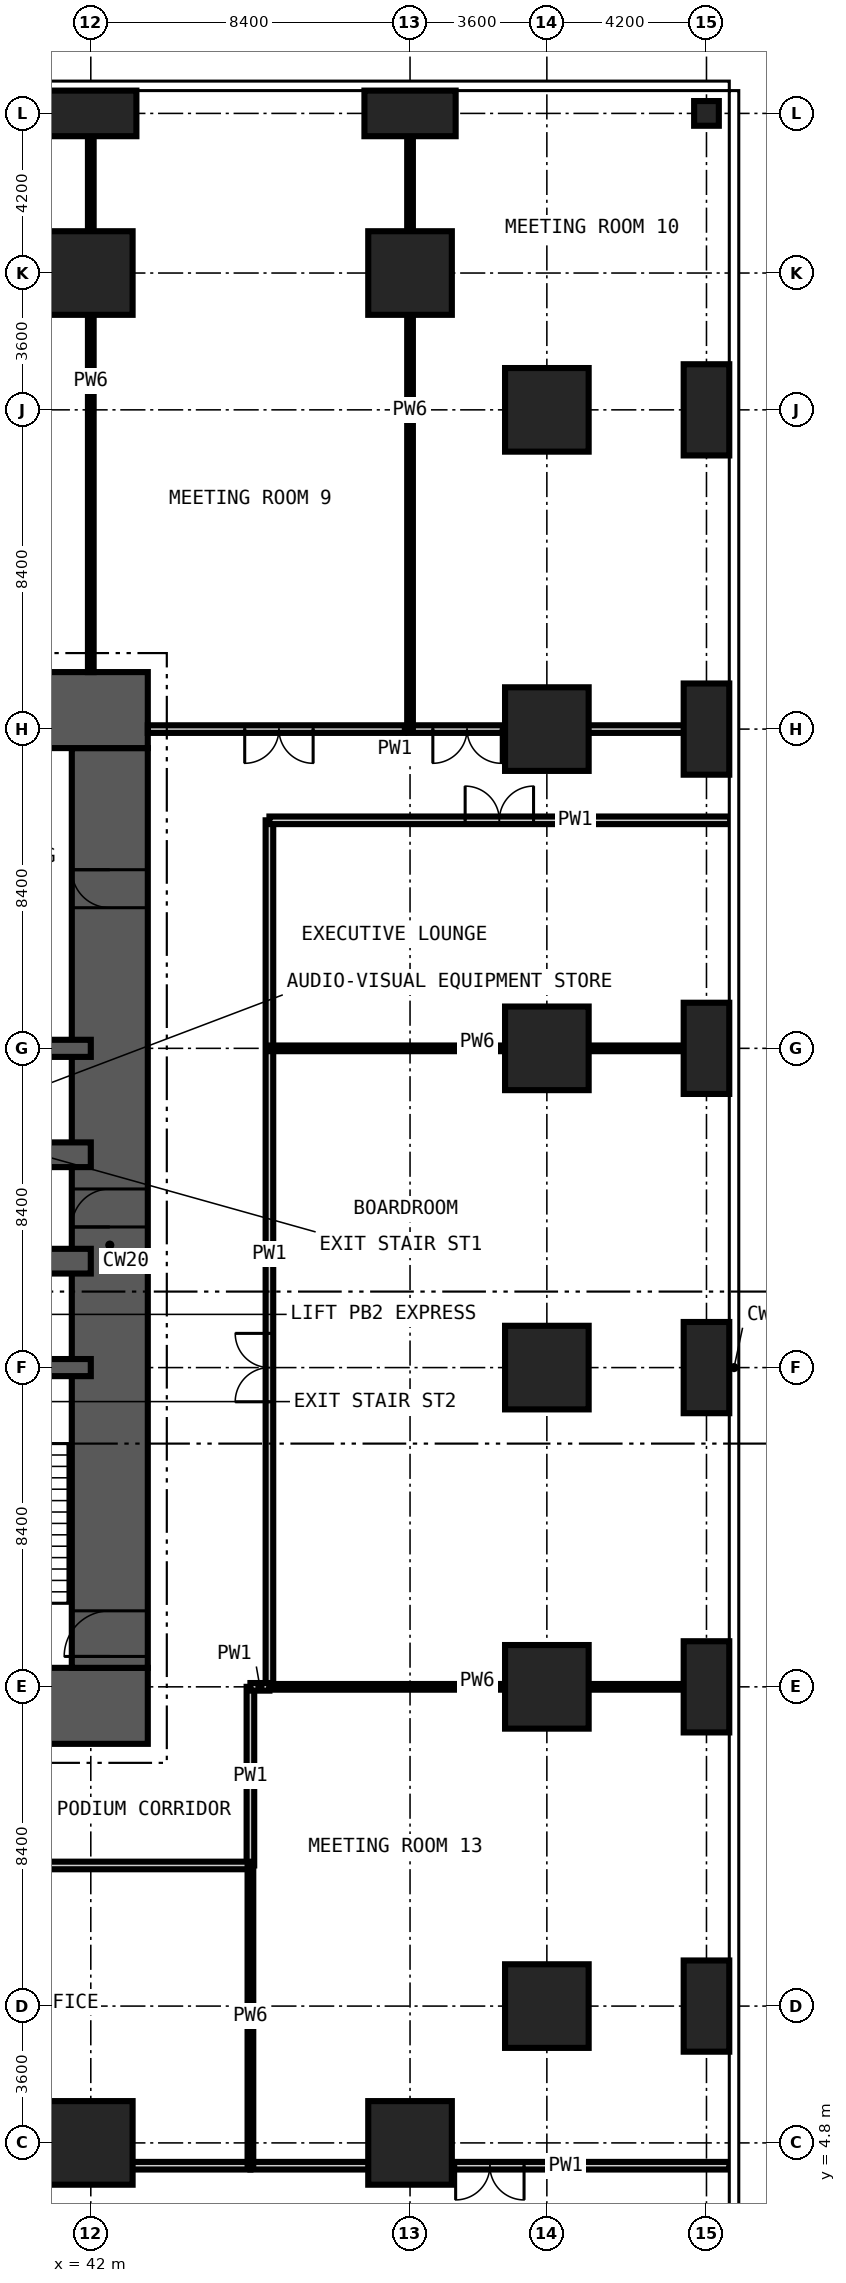
"""IFC4 building model, lengths in metres.
Left out: names, types, materials, properties, quantities, classifications, styles, units other than length and angle.
Written with IfcOpenShell. Run it as: python <this file> out.ifc"""

import sys

from ifc_helpers import new_model, si_unit, direction, frame, frame_2d, origin, origin_2d, place, context, subcontext, project, spatial, rectangle, extrude, element, fill, save


model = new_model("IFC4")
c1 = context("Model", 3, precision=1e-05, world=origin(), true_north=direction((0.0, 1.0)))
c2 = subcontext(c1, "Body", "Model", "MODEL_VIEW")
j1 = project(units=[si_unit("LENGTHUNIT", "METRE"), si_unit("PLANEANGLEUNIT", "RADIAN")], contexts=[c1])
p1 = place(None, origin())
s1 = spatial("IfcSite", under=j1, at=p1, CompositionType="ELEMENT")
p2 = place(p1, origin())
s2 = spatial("IfcBuilding", under=s1, at=p2, CompositionType="ELEMENT")
p3 = place(p2, frame((0.0, 0.0, 12.0)))
s3 = spatial("IfcBuildingStorey", under=s2, at=p3, CompositionType="ELEMENT", Elevation=12.0)
for number, where, z_axis, x_axis in (
    (1, (42.0, 4.8, -0.3), (0.0, 0.0, 1.0), (1.0, 0.0, 0.0)),
    (2, (42.0, 54.0, -0.3), (0.0, 0.0, 1.0), (1.0, 0.0, 0.0)),
):
    element("IfcColumn", number, at=place(p3, frame(where, z_axis=z_axis, x_axis=x_axis)), inside=s3, PredefinedType="COLUMN", context=c2, shape_type="SweptSolid", body=[
        extrude(rectangle(XDim=2.2, YDim=2.2, at=origin_2d()), origin(), (0.0, 0.0, 1.0), 5.0),
    ])
p4 = place(p3, frame((42.0, 58.2, -0.3), z_axis=(0.0, 0.0, 1.0), x_axis=(1.0, 0.0, 0.0)))
e3 = element("IfcColumn", 3, at=p4, inside=s3, PredefinedType="COLUMN", context=c2, shape_type="SweptSolid", body=[
    extrude(rectangle(XDim=2.4, YDim=1.2, at=origin_2d()), origin(), (0.0, 0.0, 1.0), 5.0),
])
for number, where, z_axis, x_axis in (
    (4, (50.4, 4.8, -0.3), (0.0, 0.0, 1.0), (1.0, 0.0, 0.0)),
    (5, (50.4, 54.0, -0.3), (0.0, 0.0, 1.0), (1.0, 0.0, 0.0)),
):
    element("IfcColumn", number, at=place(p3, frame(where, z_axis=z_axis, x_axis=x_axis)), inside=s3, PredefinedType="COLUMN", context=c2, shape_type="SweptSolid", body=[
        extrude(rectangle(XDim=2.2, YDim=2.2, at=origin_2d()), origin(), (0.0, 0.0, 1.0), 5.0),
    ])
p5 = place(p3, frame((50.4, 58.2, -0.3), z_axis=(0.0, 0.0, 1.0), x_axis=(1.0, 0.0, 0.0)))
e6 = element("IfcColumn", 6, at=p5, inside=s3, PredefinedType="COLUMN", context=c2, shape_type="SweptSolid", body=[
    extrude(rectangle(XDim=2.4, YDim=1.2, at=origin_2d()), origin(), (0.0, 0.0, 1.0), 5.0),
])
for number, where, z_axis, x_axis in (
    (7, (54.0, 8.4, -0.3), (0.0, 0.0, 1.0), (1.0, 0.0, 0.0)),
    (8, (54.0, 16.8, -0.3), (0.0, 0.0, 1.0), (1.0, 0.0, 0.0)),
    (9, (54.0, 25.2, -0.3), (0.0, 0.0, 1.0), (1.0, 0.0, 0.0)),
    (10, (54.0, 33.6, -0.3), (0.0, 0.0, 1.0), (1.0, 0.0, 0.0)),
    (11, (54.0, 42.0, -0.3), (0.0, 0.0, 1.0), (1.0, 0.0, 0.0)),
    (12, (54.0, 50.4, -0.3), (0.0, 0.0, 1.0), (1.0, 0.0, 0.0)),
):
    element("IfcColumn", number, at=place(p3, frame(where, z_axis=z_axis, x_axis=x_axis)), inside=s3, PredefinedType="COLUMN", context=c2, shape_type="SweptSolid", body=[
        extrude(rectangle(XDim=2.2, YDim=2.2, at=origin_2d()), origin(), (0.0, 0.0, 1.0), 5.0),
    ])
for number, where, z_axis, x_axis in (
    (13, (58.2, 8.4, -0.3), (0.0, 0.0, 1.0), (1.0, 0.0, 0.0)),
    (14, (58.2, 16.8, -0.3), (0.0, 0.0, 1.0), (1.0, 0.0, 0.0)),
    (15, (58.2, 25.2, -0.3), (0.0, 0.0, 1.0), (1.0, 0.0, 0.0)),
    (16, (58.2, 33.6, -0.3), (0.0, 0.0, 1.0), (1.0, 0.0, 0.0)),
    (17, (58.2, 42.0, -0.3), (0.0, 0.0, 1.0), (1.0, 0.0, 0.0)),
    (18, (58.2, 50.4, -0.3), (0.0, 0.0, 1.0), (1.0, 0.0, 0.0)),
):
    element("IfcColumn", number, at=place(p3, frame(where, z_axis=z_axis, x_axis=x_axis)), inside=s3, PredefinedType="COLUMN", context=c2, shape_type="SweptSolid", body=[
        extrude(rectangle(XDim=1.2, YDim=2.4, at=origin_2d()), origin(), (0.0, 0.0, 1.0), 5.0),
    ])
p6 = place(p3, frame((58.2, 58.2, -0.3), z_axis=(0.0, 0.0, 1.0), x_axis=(1.0, 0.0, 0.0)))
e19 = element("IfcColumn", 19, at=p6, inside=s3, PredefinedType="COLUMN", context=c2, shape_type="SweptSolid", body=[
    extrude(rectangle(XDim=0.65, YDim=0.65, at=origin_2d()), origin(), (0.0, 0.0, 1.0), 5.0),
])
p7 = place(p3, frame((15.3, 16.3, -0.3), z_axis=(0.0, 0.0, 1.0), x_axis=(1.0, 0.0, 0.0)))
e20 = element("IfcWall", 20, at=p7, inside=s3, PredefinedType="SHEAR", context=c2, shape_type="SweptSolid", body=[
    extrude(rectangle(XDim=28.2, YDim=2.0, at=frame_2d((14.1, 0.0))), origin(), (0.0, 0.0, 1.0), 5.0),
])
p8 = place(p7, frame((13.6, 0.0, 0.3)))
e21 = element("IfcOpeningElement", 21, at=p8, cuts=e20, PredefinedType="OPENING", context=c2, shape_type="SweptSolid", body=[
    extrude(rectangle(XDim=1.0, YDim=2.1, at=frame_2d((0.5, 1.05))), frame((0.0, 1.01, 0.0), z_axis=(0.0, -1.0, 0.0), x_axis=(1.0, 0.0, 0.0)), (0.0, 0.0, 1.0), 2.02),
])
p9 = place(p7, frame((19.9, 0.0, 0.3)))
e22 = element("IfcOpeningElement", 22, at=p9, cuts=e20, PredefinedType="OPENING", context=c2, shape_type="SweptSolid", body=[
    extrude(rectangle(XDim=1.0, YDim=2.1, at=frame_2d((0.5, 1.05))), frame((0.0, 1.01, 0.0), z_axis=(0.0, -1.0, 0.0), x_axis=(1.0, 0.0, 0.0)), (0.0, 0.0, 1.0), 2.02),
])
p10 = place(p3, frame((42.5, 17.3, -0.3), z_axis=(0.0, 0.0, 1.0), x_axis=(0.0, 1.0, 0.0)))
e23 = element("IfcWall", 23, at=p10, inside=s3, PredefinedType="SHEAR", context=c2, shape_type="SweptSolid", body=[
    extrude(rectangle(XDim=24.2, YDim=2.0, at=frame_2d((12.1, 0.0))), origin(), (0.0, 0.0, 1.0), 5.0),
])
p11 = place(p10, frame((0.3, 0.0, 0.3)))
e24 = element("IfcOpeningElement", 24, at=p11, cuts=e23, PredefinedType="OPENING", context=c2, shape_type="SweptSolid", body=[
    extrude(rectangle(XDim=1.2, YDim=2.2, at=frame_2d((0.6, 1.1))), frame((0.0, 1.01, 0.0), z_axis=(0.0, -1.0, 0.0), x_axis=(1.0, 0.0, 0.0)), (0.0, 0.0, 1.0), 2.02),
])
p12 = place(p10, frame((11.6, 0.0, 0.3)))
e25 = element("IfcOpeningElement", 25, at=p12, cuts=e23, PredefinedType="OPENING", context=c2, shape_type="SweptSolid", body=[
    extrude(rectangle(XDim=1.0, YDim=2.1, at=frame_2d((0.5, 1.05))), frame((0.0, 1.01, 0.0), z_axis=(0.0, -1.0, 0.0), x_axis=(1.0, 0.0, 0.0)), (0.0, 0.0, 1.0), 2.02),
])
p13 = place(p10, frame((20.0, 0.0, 0.3)))
e26 = element("IfcOpeningElement", 26, at=p13, cuts=e23, PredefinedType="OPENING", context=c2, shape_type="SweptSolid", body=[
    extrude(rectangle(XDim=1.0, YDim=2.1, at=frame_2d((0.5, 1.05))), frame((0.0, 1.01, 0.0), z_axis=(0.0, -1.0, 0.0), x_axis=(1.0, 0.0, 0.0)), (0.0, 0.0, 1.0), 2.02),
])
p14 = place(p3, frame((43.5, 42.5, -0.3), z_axis=(0.0, 0.0, 1.0), x_axis=(-1.0, 0.0, 0.0)))
e27 = element("IfcWall", 27, at=p14, inside=s3, PredefinedType="SHEAR", context=c2, shape_type="SweptSolid", body=[
    extrude(rectangle(XDim=28.2, YDim=2.0, at=frame_2d((14.1, 0.0))), origin(), (0.0, 0.0, 1.0), 5.0),
])
p15 = place(p14, frame((21.4, 0.0, 0.3)))
e28 = element("IfcOpeningElement", 28, at=p15, cuts=e27, PredefinedType="OPENING", context=c2, shape_type="SweptSolid", body=[
    extrude(rectangle(XDim=1.0, YDim=2.1, at=frame_2d((0.5, 1.05))), frame((0.0, 1.01, 0.0), z_axis=(0.0, -1.0, 0.0), x_axis=(1.0, 0.0, 0.0)), (0.0, 0.0, 1.0), 2.02),
])
p16 = place(p14, frame((11.4, 0.0, 0.3)))
e29 = element("IfcOpeningElement", 29, at=p16, cuts=e27, PredefinedType="OPENING", context=c2, shape_type="SweptSolid", body=[
    extrude(rectangle(XDim=1.2, YDim=2.2, at=frame_2d((0.6, 1.1))), frame((0.0, 1.01, 0.0), z_axis=(0.0, -1.0, 0.0), x_axis=(1.0, 0.0, 0.0)), (0.0, 0.0, 1.0), 2.02),
])
for number, where, z_axis, x_axis in (
    (30, (16.8, 25.2, -0.3), (0.0, 0.0, 1.0), (1.0, 0.0, 0.0)),
    (31, (16.8, 33.6, -0.3), (0.0, 0.0, 1.0), (1.0, 0.0, 0.0)),
):
    element("IfcWall", number, at=place(p3, frame(where, z_axis=z_axis, x_axis=x_axis)), inside=s3, PredefinedType="SHEAR", context=c2, shape_type="SweptSolid", body=[
        extrude(rectangle(XDim=25.2, YDim=0.45, at=frame_2d((12.6, 0.0))), origin(), (0.0, 0.0, 1.0), 5.0),
    ])
p17 = place(p3, frame((33.6, 28.0, -0.3), z_axis=(0.0, 0.0, 1.0), x_axis=(1.0, 0.0, 0.0)))
e32 = element("IfcWall", 32, at=p17, inside=s3, PredefinedType="SHEAR", context=c2, shape_type="SweptSolid", body=[
    extrude(rectangle(XDim=8.4, YDim=0.65, at=frame_2d((4.2, 0.0))), origin(), (0.0, 0.0, 1.0), 5.0),
])
p18 = place(p3, frame((33.6, 30.8, -0.3), z_axis=(0.0, 0.0, 1.0), x_axis=(1.0, 0.0, 0.0)))
e33 = element("IfcWall", 33, at=p18, inside=s3, PredefinedType="SHEAR", context=c2, shape_type="SweptSolid", body=[
    extrude(rectangle(XDim=8.4, YDim=0.65, at=frame_2d((4.2, 0.0))), origin(), (0.0, 0.0, 1.0), 5.0),
])
p19 = place(p18, frame((1.6, 0.0, 0.3)))
e34 = element("IfcOpeningElement", 34, at=p19, cuts=e33, PredefinedType="OPENING", context=c2, shape_type="SweptSolid", body=[
    extrude(rectangle(XDim=1.0, YDim=2.1, at=frame_2d((0.5, 1.05))), frame((0.0, 0.335, 0.0), z_axis=(0.0, -1.0, 0.0), x_axis=(1.0, 0.0, 0.0)), (0.0, 0.0, 1.0), 0.67),
])
p20 = place(p18, frame((4.6, 0.0, 0.3)))
e35 = element("IfcOpeningElement", 35, at=p20, cuts=e33, PredefinedType="OPENING", context=c2, shape_type="SweptSolid", body=[
    extrude(rectangle(XDim=1.0, YDim=2.1, at=frame_2d((0.5, 1.05))), frame((0.0, 0.335, 0.0), z_axis=(0.0, -1.0, 0.0), x_axis=(1.0, 0.0, 0.0)), (0.0, 0.0, 1.0), 0.67),
])
p21 = place(p3, frame((46.2, 12.1, 0.0), z_axis=(0.0, 0.0, 1.0), x_axis=(0.0, 1.0, 0.0)))
e36 = element("IfcWall", 36, at=p21, inside=s3, PredefinedType="PARTITIONING", context=c2, shape_type="SweptSolid", body=[
    extrude(rectangle(XDim=4.7, YDim=0.2, at=frame_2d((2.35, 0.0))), origin(), (0.0, 0.0, 1.0), 4.7),
])
p22 = place(p3, frame((46.7, 16.8, 0.0), z_axis=(0.0, 0.0, 1.0), x_axis=(0.0, 1.0, 0.0)))
e37 = element("IfcWall", 37, at=p22, inside=s3, PredefinedType="PARTITIONING", context=c2, shape_type="SweptSolid", body=[
    extrude(rectangle(XDim=22.8, YDim=0.2, at=frame_2d((11.4, 0.0))), origin(), (0.0, 0.0, 1.0), 4.7),
])
p23 = place(p22, frame((7.5, 0.0, 0.0)))
e38 = element("IfcOpeningElement", 38, at=p23, cuts=e37, PredefinedType="OPENING", context=c2, shape_type="SweptSolid", body=[
    extrude(rectangle(XDim=1.8, YDim=2.4, at=frame_2d((0.9, 1.2))), frame((0.0, 0.11, 0.0), z_axis=(0.0, -1.0, 0.0), x_axis=(1.0, 0.0, 0.0)), (0.0, 0.0, 1.0), 0.22),
])
p24 = place(p3, frame((0.0, 4.2, 0.0), z_axis=(0.0, 0.0, 1.0), x_axis=(1.0, 0.0, 0.0)))
e39 = element("IfcWall", 39, at=p24, inside=s3, PredefinedType="PARTITIONING", context=c2, shape_type="SweptSolid", body=[
    extrude(rectangle(XDim=46.2, YDim=0.2, at=frame_2d((23.1, 0.0))), origin(), (0.0, 0.0, 1.0), 4.7),
])
p25 = place(p24, frame((5.8, 0.0, 0.0)))
e40 = element("IfcOpeningElement", 40, at=p25, cuts=e39, PredefinedType="OPENING", context=c2, shape_type="SweptSolid", body=[
    extrude(rectangle(XDim=1.0, YDim=2.1, at=frame_2d((0.5, 1.05))), frame((0.0, 0.11, 0.0), z_axis=(0.0, -1.0, 0.0), x_axis=(1.0, 0.0, 0.0)), (0.0, 0.0, 1.0), 0.22),
])
p26 = place(p24, frame((18.4, 0.0, 0.0)))
e41 = element("IfcOpeningElement", 41, at=p26, cuts=e39, PredefinedType="OPENING", context=c2, shape_type="SweptSolid", body=[
    extrude(rectangle(XDim=1.0, YDim=2.1, at=frame_2d((0.5, 1.05))), frame((0.0, 0.11, 0.0), z_axis=(0.0, -1.0, 0.0), x_axis=(1.0, 0.0, 0.0)), (0.0, 0.0, 1.0), 0.22),
])
p27 = place(p24, frame((28.9, 0.0, 0.0)))
e42 = element("IfcOpeningElement", 42, at=p27, cuts=e39, PredefinedType="OPENING", context=c2, shape_type="SweptSolid", body=[
    extrude(rectangle(XDim=1.0, YDim=2.1, at=frame_2d((0.5, 1.05))), frame((0.0, 0.11, 0.0), z_axis=(0.0, -1.0, 0.0), x_axis=(1.0, 0.0, 0.0)), (0.0, 0.0, 1.0), 0.22),
])
p28 = place(p24, frame((39.4, 0.0, 0.0)))
e43 = element("IfcOpeningElement", 43, at=p28, cuts=e39, PredefinedType="OPENING", context=c2, shape_type="SweptSolid", body=[
    extrude(rectangle(XDim=1.0, YDim=2.1, at=frame_2d((0.5, 1.05))), frame((0.0, 0.11, 0.0), z_axis=(0.0, -1.0, 0.0), x_axis=(1.0, 0.0, 0.0)), (0.0, 0.0, 1.0), 0.22),
])
p29 = place(p3, frame((12.6, 12.1, 0.0), z_axis=(0.0, 0.0, 1.0), x_axis=(1.0, 0.0, 0.0)))
e44 = element("IfcWall", 44, at=p29, inside=s3, PredefinedType="PARTITIONING", context=c2, shape_type="SweptSolid", body=[
    extrude(rectangle(XDim=33.6, YDim=0.2, at=frame_2d((16.8, 0.0))), origin(), (0.0, 0.0, 1.0), 4.7),
])
p30 = place(p3, frame((46.2, 16.8, 0.0), z_axis=(0.0, 0.0, 1.0), x_axis=(1.0, 0.0, 0.0)))
e45 = element("IfcWall", 45, at=p30, inside=s3, PredefinedType="PARTITIONING", context=c2, shape_type="SweptSolid", body=[
    extrude(rectangle(XDim=0.5, YDim=0.2, at=frame_2d((0.25, 0.0))), origin(), (0.0, 0.0, 1.0), 4.7),
])
p31 = place(p3, frame((46.7, 39.6, 0.0), z_axis=(0.0, 0.0, 1.0), x_axis=(1.0, 0.0, 0.0)))
e46 = element("IfcWall", 46, at=p31, inside=s3, PredefinedType="PARTITIONING", context=c2, shape_type="SweptSolid", body=[
    extrude(rectangle(XDim=12.123, YDim=0.2, at=frame_2d((6.062, 0.0))), origin(), (0.0, 0.0, 1.0), 4.7),
])
p32 = place(p31, frame((5.15, 0.0, 0.0)))
e47 = element("IfcOpeningElement", 47, at=p32, cuts=e46, PredefinedType="OPENING", context=c2, shape_type="SweptSolid", body=[
    extrude(rectangle(XDim=1.8, YDim=2.4, at=frame_2d((0.9, 1.2))), frame((0.0, 0.11, 0.0), z_axis=(0.0, -1.0, 0.0), x_axis=(1.0, 0.0, 0.0)), (0.0, 0.0, 1.0), 0.22),
])
p33 = place(p3, frame((58.8, 4.2, 0.0), z_axis=(0.0, 0.0, 1.0), x_axis=(-1.0, 0.0, 0.0)))
e48 = element("IfcWall", 48, at=p33, inside=s3, PredefinedType="PARTITIONING", context=c2, shape_type="SweptSolid", body=[
    extrude(rectangle(XDim=12.6, YDim=0.2, at=frame_2d((6.3, 0.0))), origin(), (0.0, 0.0, 1.0), 4.7),
])
p34 = place(p33, frame((5.4, 0.0, 0.0)))
e49 = element("IfcOpeningElement", 49, at=p34, cuts=e48, PredefinedType="OPENING", context=c2, shape_type="SweptSolid", body=[
    extrude(rectangle(XDim=1.8, YDim=2.4, at=frame_2d((0.9, 1.2))), frame((0.0, 0.11, 0.0), z_axis=(0.0, -1.0, 0.0), x_axis=(1.0, 0.0, 0.0)), (0.0, 0.0, 1.0), 0.22),
])
p35 = place(p3, frame((58.8, 42.0, 0.0), z_axis=(0.0, 0.0, 1.0), x_axis=(-1.0, 0.0, 0.0)))
e50 = element("IfcWall", 50, at=p35, inside=s3, PredefinedType="PARTITIONING", context=c2, shape_type="SweptSolid", body=[
    extrude(rectangle(XDim=15.3, YDim=0.2, at=frame_2d((7.65, 0.0))), origin(), (0.0, 0.0, 1.0), 4.7),
])
p36 = place(p35, frame((10.95, 0.0, 0.0)))
e51 = element("IfcOpeningElement", 51, at=p36, cuts=e50, PredefinedType="OPENING", context=c2, shape_type="SweptSolid", body=[
    extrude(rectangle(XDim=1.8, YDim=2.4, at=frame_2d((0.9, 1.2))), frame((0.0, 0.11, 0.0), z_axis=(0.0, -1.0, 0.0), x_axis=(1.0, 0.0, 0.0)), (0.0, 0.0, 1.0), 0.22),
])
p37 = place(p35, frame((6.0, 0.0, 0.0)))
e52 = element("IfcOpeningElement", 52, at=p37, cuts=e50, PredefinedType="OPENING", context=c2, shape_type="SweptSolid", body=[
    extrude(rectangle(XDim=1.8, YDim=2.4, at=frame_2d((0.9, 1.2))), frame((0.0, 0.11, 0.0), z_axis=(0.0, -1.0, 0.0), x_axis=(1.0, 0.0, 0.0)), (0.0, 0.0, 1.0), 0.22),
])
p38 = place(p3, frame((42.0, 43.5, 0.0), z_axis=(0.0, 0.0, 1.0), x_axis=(0.0, 1.0, 0.0)))
e53 = element("IfcWall", 53, at=p38, inside=s3, PredefinedType="PARTITIONING", context=c2, shape_type="SweptSolid", body=[
    extrude(rectangle(XDim=15.3, YDim=0.15, at=frame_2d((7.65, 0.0))), origin(), (0.0, 0.0, 1.0), 4.7),
])
p39 = place(p3, frame((46.2, 4.2, 0.0), z_axis=(0.0, 0.0, 1.0), x_axis=(0.0, 1.0, 0.0)))
e54 = element("IfcWall", 54, at=p39, inside=s3, PredefinedType="PARTITIONING", context=c2, shape_type="SweptSolid", body=[
    extrude(rectangle(XDim=7.9, YDim=0.15, at=frame_2d((3.95, 0.0))), origin(), (0.0, 0.0, 1.0), 4.7),
])
p40 = place(p3, frame((50.4, 42.0, 0.0), z_axis=(0.0, 0.0, 1.0), x_axis=(0.0, 1.0, 0.0)))
e55 = element("IfcWall", 55, at=p40, inside=s3, PredefinedType="PARTITIONING", context=c2, shape_type="SweptSolid", body=[
    extrude(rectangle(XDim=16.8, YDim=0.15, at=frame_2d((8.4, 0.0))), origin(), (0.0, 0.0, 1.0), 4.7),
])
for number, where, z_axis, x_axis in (
    (56, (46.7, 16.8, 0.0), (0.0, 0.0, 1.0), (1.0, 0.0, 0.0)),
    (57, (46.7, 33.6, 0.0), (0.0, 0.0, 1.0), (1.0, 0.0, 0.0)),
):
    element("IfcWall", number, at=place(p3, frame(where, z_axis=z_axis, x_axis=x_axis)), inside=s3, PredefinedType="PARTITIONING", context=c2, shape_type="SweptSolid", body=[
        extrude(rectangle(XDim=12.1, YDim=0.15, at=frame_2d((6.05, 0.0))), origin(), (0.0, 0.0, 1.0), 4.7),
    ])
p41 = place(p11, origin())
e58 = element("IfcDoor", 58, at=p41, inside=s3, OperationType="SINGLE_SWING_LEFT", PredefinedType="DOOR", context=c2, shape_type="SweptSolid", body=[
    extrude(rectangle(XDim=1.2, YDim=2.2, at=frame_2d((0.6, 1.1))), frame((0.0, 0.025, 0.0), z_axis=(0.0, -1.0, 0.0), x_axis=(1.0, 0.0, 0.0)), (0.0, 0.0, 1.0), 0.05),
])
fill(e24, e58)
p42 = place(p12, origin())
e59 = element("IfcDoor", 59, at=p42, inside=s3, OperationType="SINGLE_SWING_LEFT", PredefinedType="DOOR", context=c2, shape_type="SweptSolid", body=[
    extrude(rectangle(XDim=1.0, YDim=2.1, at=frame_2d((0.5, 1.05))), frame((0.0, 0.025, 0.0), z_axis=(0.0, -1.0, 0.0), x_axis=(1.0, 0.0, 0.0)), (0.0, 0.0, 1.0), 0.05),
])
fill(e25, e59)
p43 = place(p13, origin())
e60 = element("IfcDoor", 60, at=p43, inside=s3, OperationType="SINGLE_SWING_RIGHT", PredefinedType="DOOR", context=c2, shape_type="SweptSolid", body=[
    extrude(rectangle(XDim=1.0, YDim=2.1, at=frame_2d((0.5, 1.05))), frame((0.0, 0.025, 0.0), z_axis=(0.0, -1.0, 0.0), x_axis=(1.0, 0.0, 0.0)), (0.0, 0.0, 1.0), 0.05),
])
fill(e26, e60)
p44 = place(p36, origin())
e61 = element("IfcDoor", 61, at=p44, inside=s3, OperationType="DOUBLE_DOOR_DOUBLE_SWING", PredefinedType="DOOR", context=c2, shape_type="SweptSolid", body=[
    extrude(rectangle(XDim=1.8, YDim=2.4, at=frame_2d((0.9, 1.2))), frame((0.0, 0.025, 0.0), z_axis=(0.0, -1.0, 0.0), x_axis=(1.0, 0.0, 0.0)), (0.0, 0.0, 1.0), 0.05),
])
fill(e51, e61)
p45 = place(p37, origin())
e62 = element("IfcDoor", 62, at=p45, inside=s3, OperationType="DOUBLE_DOOR_DOUBLE_SWING", PredefinedType="DOOR", context=c2, shape_type="SweptSolid", body=[
    extrude(rectangle(XDim=1.8, YDim=2.4, at=frame_2d((0.9, 1.2))), frame((0.0, 0.025, 0.0), z_axis=(0.0, -1.0, 0.0), x_axis=(1.0, 0.0, 0.0)), (0.0, 0.0, 1.0), 0.05),
])
fill(e52, e62)
p46 = place(p23, origin())
e63 = element("IfcDoor", 63, at=p46, inside=s3, OperationType="DOUBLE_DOOR_DOUBLE_SWING", PredefinedType="DOOR", context=c2, shape_type="SweptSolid", body=[
    extrude(rectangle(XDim=1.8, YDim=2.4, at=frame_2d((0.9, 1.2))), frame((0.0, 0.025, 0.0), z_axis=(0.0, -1.0, 0.0), x_axis=(1.0, 0.0, 0.0)), (0.0, 0.0, 1.0), 0.05),
])
fill(e38, e63)
p47 = place(p34, origin())
e64 = element("IfcDoor", 64, at=p47, inside=s3, OperationType="DOUBLE_DOOR_DOUBLE_SWING", PredefinedType="DOOR", context=c2, shape_type="SweptSolid", body=[
    extrude(rectangle(XDim=1.8, YDim=2.4, at=frame_2d((0.9, 1.2))), frame((0.0, 0.025, 0.0), z_axis=(0.0, -1.0, 0.0), x_axis=(1.0, 0.0, 0.0)), (0.0, 0.0, 1.0), 0.05),
])
fill(e49, e64)
p48 = place(p32, origin())
e65 = element("IfcDoor", 65, at=p48, inside=s3, OperationType="DOUBLE_DOOR_DOUBLE_SWING", PredefinedType="DOOR", context=c2, shape_type="SweptSolid", body=[
    extrude(rectangle(XDim=1.8, YDim=2.4, at=frame_2d((0.9, 1.2))), frame((0.0, 0.025, 0.0), z_axis=(0.0, -1.0, 0.0), x_axis=(1.0, 0.0, 0.0)), (0.0, 0.0, 1.0), 0.05),
])
fill(e47, e65)
save(model, sys.argv[1])
